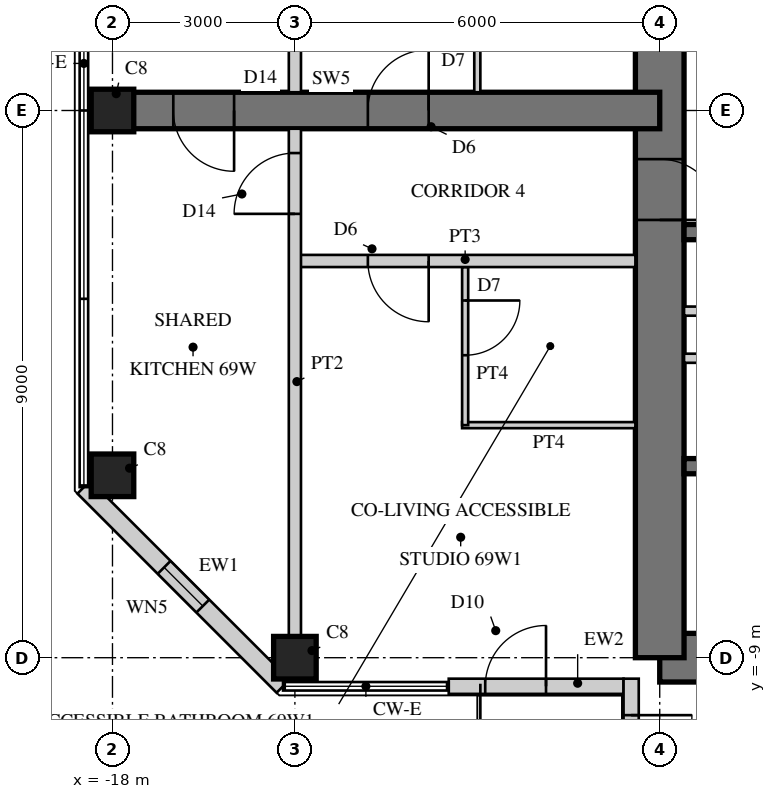
"""IFC4 building model, lengths in metres.
Left out: names, types, materials, properties, quantities, classifications, styles, units other than length and angle.
Written with IfcOpenShell. Run it as: python <this file> out.ifc"""

import sys

from ifc_helpers import new_model, si_unit, direction, frame, frame_2d, origin, origin_2d, place, context, subcontext, project, spatial, rectangle, hollow_rectangle, extrude, element, fill, save


model = new_model("IFC4")
c1 = context("Model", 3, precision=1e-05, world=origin(), true_north=direction((0.0, 1.0)))
c2 = subcontext(c1, "Body", "Model", "MODEL_VIEW")
j1 = project(units=[si_unit("LENGTHUNIT", "METRE"), si_unit("PLANEANGLEUNIT", "RADIAN")], contexts=[c1])
p1 = place(None, origin())
s1 = spatial("IfcSite", under=j1, at=p1, CompositionType="ELEMENT")
p2 = place(p1, origin())
s2 = spatial("IfcBuilding", under=s1, at=p2, CompositionType="ELEMENT")
p3 = place(p2, frame((0.0, 0.0, 267.9)))
s3 = spatial("IfcBuildingStorey", under=s2, at=p3, CompositionType="ELEMENT", Elevation=267.9)
p4 = place(p3, frame((-9.0, -9.0, 0.0), z_axis=(0.0, 0.0, 1.0), x_axis=(1.0, 0.0, 0.0)))
e1 = element("IfcWall", 1, at=p4, inside=s3, PredefinedType="SHEAR", context=c2, shape_type="SweptSolid", body=[
    extrude(rectangle(XDim=18.0, YDim=0.8, at=frame_2d((9.0, 0.0))), origin(), (0.0, 0.0, 1.0), 3.4),
])
p5 = place(p4, frame((9.8, 0.0, 0.0)))
e2 = element("IfcOpeningElement", 2, at=p5, cuts=e1, PredefinedType="OPENING", context=c2, shape_type="SweptSolid", body=[
    extrude(rectangle(XDim=1.0, YDim=2.4, at=frame_2d((0.5, 1.2))), frame((0.0, 0.41, 0.0), z_axis=(0.0, -1.0, 0.0), x_axis=(1.0, 0.0, 0.0)), (0.0, 0.0, 1.0), 0.82),
])
p6 = place(p3, frame((-9.0, 9.0, 0.0), z_axis=(0.0, 0.0, 1.0), x_axis=(0.0, -1.0, 0.0)))
e3 = element("IfcWall", 3, at=p6, inside=s3, PredefinedType="SHEAR", context=c2, shape_type="SweptSolid", body=[
    extrude(rectangle(XDim=18.0, YDim=0.8, at=frame_2d((9.0, 0.0))), origin(), (0.0, 0.0, 1.0), 3.4),
])
p7 = place(p6, frame((9.8, 0.0, 0.0)))
e4 = element("IfcOpeningElement", 4, at=p7, cuts=e3, PredefinedType="OPENING", context=c2, shape_type="SweptSolid", body=[
    extrude(rectangle(XDim=1.0, YDim=2.4, at=frame_2d((0.5, 1.2))), frame((0.0, 0.41, 0.0), z_axis=(0.0, -1.0, 0.0), x_axis=(1.0, 0.0, 0.0)), (0.0, 0.0, 1.0), 0.82),
])
p8 = place(p3, frame((-1.925, -2.0, 0.0), z_axis=(0.0, 0.0, 1.0), x_axis=(-1.0, 0.0, 0.0)))
e5 = element("IfcWall", 5, at=p8, inside=s3, PredefinedType="SHEAR", context=c2, shape_type="SweptSolid", body=[
    extrude(rectangle(XDim=6.675, YDim=0.25, at=frame_2d((3.337, 0.0))), origin(), (0.0, 0.0, 1.0), 3.4),
])
p9 = place(p3, frame((-1.925, -5.85, 0.0), z_axis=(0.0, 0.0, 1.0), x_axis=(-1.0, 0.0, 0.0)))
e6 = element("IfcWall", 6, at=p9, inside=s3, PredefinedType="SHEAR", context=c2, shape_type="SweptSolid", body=[
    extrude(rectangle(XDim=6.675, YDim=0.25, at=frame_2d((3.337, 0.0))), origin(), (0.0, 0.0, 1.0), 3.4),
])
p10 = place(p9, frame((0.496, 0.0, 0.0)))
e7 = element("IfcOpeningElement", 7, at=p10, cuts=e6, PredefinedType="OPENING", context=c2, shape_type="SweptSolid", body=[
    extrude(rectangle(XDim=1.1, YDim=2.2, at=frame_2d((0.55, 1.1))), frame((0.0, 0.135, 0.0), z_axis=(0.0, -1.0, 0.0), x_axis=(1.0, 0.0, 0.0)), (0.0, 0.0, 1.0), 0.27),
])
p11 = place(p9, frame((2.788, 0.0, 0.0)))
e8 = element("IfcOpeningElement", 8, at=p11, cuts=e6, PredefinedType="OPENING", context=c2, shape_type="SweptSolid", body=[
    extrude(rectangle(XDim=1.1, YDim=2.2, at=frame_2d((0.55, 1.1))), frame((0.0, 0.135, 0.0), z_axis=(0.0, -1.0, 0.0), x_axis=(1.0, 0.0, 0.0)), (0.0, 0.0, 1.0), 0.27),
])
p12 = place(p9, frame((5.079, 0.0, 0.0)))
e9 = element("IfcOpeningElement", 9, at=p12, cuts=e6, PredefinedType="OPENING", context=c2, shape_type="SweptSolid", body=[
    extrude(rectangle(XDim=1.1, YDim=2.2, at=frame_2d((0.55, 1.1))), frame((0.0, 0.135, 0.0), z_axis=(0.0, -1.0, 0.0), x_axis=(1.0, 0.0, 0.0)), (0.0, 0.0, 1.0), 0.27),
])
p13 = place(p3, frame((-1.925, -3.3, 0.0), z_axis=(0.0, 0.0, 1.0), x_axis=(-1.0, 0.0, 0.0)))
e10 = element("IfcWall", 10, at=p13, inside=s3, PredefinedType="PARTITIONING", context=c2, shape_type="SweptSolid", body=[
    extrude(rectangle(XDim=6.675, YDim=0.15, at=frame_2d((3.337, 0.0))), origin(), (0.0, 0.0, 1.0), 3.4),
])
p14 = place(p13, frame((0.075, 0.0, 0.0)))
e11 = element("IfcOpeningElement", 11, at=p14, cuts=e10, PredefinedType="OPENING", context=c2, shape_type="SweptSolid", body=[
    extrude(rectangle(XDim=0.8, YDim=2.1, at=frame_2d((0.4, 1.05))), frame((0.0, 0.085, 0.0), z_axis=(0.0, -1.0, 0.0), x_axis=(1.0, 0.0, 0.0)), (0.0, 0.0, 1.0), 0.17),
])
p15 = place(p13, frame((3.675, 0.0, 0.0)))
e12 = element("IfcOpeningElement", 12, at=p15, cuts=e10, PredefinedType="OPENING", context=c2, shape_type="SweptSolid", body=[
    extrude(rectangle(XDim=0.8, YDim=2.1, at=frame_2d((0.4, 1.05))), frame((0.0, 0.085, 0.0), z_axis=(0.0, -1.0, 0.0), x_axis=(1.0, 0.0, 0.0)), (0.0, 0.0, 1.0), 0.17),
])
p16 = place(p3, frame((-9.0, 0.0, 0.0), z_axis=(0.0, 0.0, 1.0), x_axis=(-1.0, 0.0, 0.0)))
e13 = element("IfcWall", 13, at=p16, inside=s3, PredefinedType="SHEAR", context=c2, shape_type="SweptSolid", body=[
    extrude(rectangle(XDim=9.0, YDim=0.6, at=frame_2d((4.5, 0.0))), origin(), (0.0, 0.0, 1.0), 3.4),
])
p17 = place(p16, frame((3.8, 0.0, 0.0)))
e14 = element("IfcOpeningElement", 14, at=p17, cuts=e13, PredefinedType="OPENING", context=c2, shape_type="SweptSolid", body=[
    extrude(rectangle(XDim=1.0, YDim=2.15, at=frame_2d((0.5, 1.075))), frame((0.0, 0.31, 0.0), z_axis=(0.0, -1.0, 0.0), x_axis=(1.0, 0.0, 0.0)), (0.0, 0.0, 1.0), 0.62),
])
p18 = place(p16, frame((7.0, 0.0, 0.0)))
e15 = element("IfcOpeningElement", 15, at=p18, cuts=e13, PredefinedType="OPENING", context=c2, shape_type="SweptSolid", body=[
    extrude(rectangle(XDim=1.0, YDim=2.2, at=frame_2d((0.5, 1.1))), frame((0.0, 0.31, 0.0), z_axis=(0.0, -1.0, 0.0), x_axis=(1.0, 0.0, 0.0)), (0.0, 0.0, 1.0), 0.62),
])
for number, where, z_axis, x_axis in (
    (16, (-15.0, -9.0, 0.0), (0.0, 0.0, 1.0), (1.0, 0.0, 0.0)),
    (17, (-18.0, 0.0, 0.0), (0.0, 0.0, 1.0), (1.0, 0.0, 0.0)),
    (18, (-18.0, -6.0, 0.0), (0.0, 0.0, 1.0), (1.0, 0.0, 0.0)),
):
    element("IfcColumn", number, at=place(p3, frame(where, z_axis=z_axis, x_axis=x_axis)), inside=s3, PredefinedType="COLUMN", context=c2, shape_type="SweptSolid", body=[
        extrude(rectangle(XDim=0.7, YDim=0.7, at=origin_2d()), origin(), (0.0, 0.0, 1.0), 3.4),
    ])
p19 = place(p3, frame((-18.47, -6.195, 0.0), z_axis=(0.0, 0.0, 1.0), x_axis=(0.707106781187, -0.707106781187, 0.0)))
e19 = element("IfcWall", 19, at=p19, inside=s3, PredefinedType="SOLIDWALL", context=c2, shape_type="SweptSolid", body=[
    extrude(rectangle(XDim=4.632, YDim=0.3, at=frame_2d((2.316, 0.0))), origin(), (0.0, 0.0, 1.0), 3.22),
])
p20 = place(p19, frame((1.866, 0.0, 0.3)))
e20 = element("IfcOpeningElement", 20, at=p20, cuts=e19, PredefinedType="OPENING", context=c2, shape_type="SweptSolid", body=[
    extrude(rectangle(XDim=0.9, YDim=2.4, at=frame_2d((0.45, 1.2))), frame((0.0, 0.16, 0.0), z_axis=(0.0, -1.0, 0.0), x_axis=(1.0, 0.0, 0.0)), (0.0, 0.0, 1.0), 0.32),
])
p21 = place(p3, frame((-12.47, -9.47, 0.0), z_axis=(0.0, 0.0, 1.0), x_axis=(1.0, 0.0, 0.0)))
e21 = element("IfcWall", 21, at=p21, inside=s3, PredefinedType="SOLIDWALL", context=c2, shape_type="SweptSolid", body=[
    extrude(rectangle(XDim=2.875, YDim=0.25, at=frame_2d((1.438, 0.0))), origin(), (0.0, 0.0, 1.0), 3.22),
])
p22 = place(p21, frame((0.6, 0.0, 0.0)))
e22 = element("IfcOpeningElement", 22, at=p22, cuts=e21, PredefinedType="OPENING", context=c2, shape_type="SweptSolid", body=[
    extrude(rectangle(XDim=1.0, YDim=2.2, at=frame_2d((0.5, 1.1))), frame((0.0, 0.135, 0.0), z_axis=(0.0, -1.0, 0.0), x_axis=(1.0, 0.0, 0.0)), (0.0, 0.0, 1.0), 0.27),
])
p23 = place(p3, frame((-9.47, -9.345, 0.0), z_axis=(0.0, 0.0, 1.0), x_axis=(0.0, -1.0, 0.0)))
e23 = element("IfcWall", 23, at=p23, inside=s3, PredefinedType="SOLIDWALL", context=c2, shape_type="SweptSolid", body=[
    extrude(rectangle(XDim=3.125, YDim=0.25, at=frame_2d((1.562, 0.0))), origin(), (0.0, 0.0, 1.0), 3.22),
])
p24 = place(p23, frame((0.6, 0.0, 0.0)))
e24 = element("IfcOpeningElement", 24, at=p24, cuts=e23, PredefinedType="OPENING", context=c2, shape_type="SweptSolid", body=[
    extrude(rectangle(XDim=1.0, YDim=2.2, at=frame_2d((0.5, 1.1))), frame((0.0, 0.135, 0.0), z_axis=(0.0, -1.0, 0.0), x_axis=(1.0, 0.0, 0.0)), (0.0, 0.0, 1.0), 0.27),
])
p25 = place(p3, frame((-3.325, -4.075, 0.0), z_axis=(0.0, 0.0, 1.0), x_axis=(-1.0, 0.0, 0.0)))
e25 = element("IfcWall", 25, at=p25, inside=s3, PredefinedType="PARTITIONING", context=c2, shape_type="SweptSolid", body=[
    extrude(rectangle(XDim=5.275, YDim=0.15, at=frame_2d((2.638, 0.0))), origin(), (0.0, 0.0, 1.0), 3.22),
])
p26 = place(p25, frame((2.137, 0.0, 0.0)))
e26 = element("IfcOpeningElement", 26, at=p26, cuts=e25, PredefinedType="OPENING", context=c2, shape_type="SweptSolid", body=[
    extrude(rectangle(XDim=1.0, YDim=2.1, at=frame_2d((0.5, 1.05))), frame((0.0, 0.085, 0.0), z_axis=(0.0, -1.0, 0.0), x_axis=(1.0, 0.0, 0.0)), (0.0, 0.0, 1.0), 0.17),
])
p27 = place(p3, frame((-9.4, -5.175, 0.0), z_axis=(0.0, 0.0, 1.0), x_axis=(-1.0, 0.0, 0.0)))
e27 = element("IfcWall", 27, at=p27, inside=s3, PredefinedType="PARTITIONING", context=c2, shape_type="SweptSolid", body=[
    extrude(rectangle(XDim=2.85, YDim=0.1, at=frame_2d((1.425, 0.0))), origin(), (0.0, 0.0, 1.0), 3.22),
])
p28 = place(p3, frame((-12.2, -2.575, 0.0), z_axis=(0.0, 0.0, 1.0), x_axis=(0.0, -1.0, 0.0)))
e28 = element("IfcWall", 28, at=p28, inside=s3, PredefinedType="PARTITIONING", context=c2, shape_type="SweptSolid", body=[
    extrude(rectangle(XDim=2.6, YDim=0.1, at=frame_2d((1.3, 0.0))), origin(), (0.0, 0.0, 1.0), 3.22),
])
p29 = place(p28, frame((0.55, 0.0, 0.0)))
e29 = element("IfcOpeningElement", 29, at=p29, cuts=e28, PredefinedType="OPENING", context=c2, shape_type="SweptSolid", body=[
    extrude(rectangle(XDim=0.9, YDim=2.1, at=frame_2d((0.45, 1.05))), frame((0.0, 0.06, 0.0), z_axis=(0.0, -1.0, 0.0), x_axis=(1.0, 0.0, 0.0)), (0.0, 0.0, 1.0), 0.12),
])
p30 = place(p3, frame((-12.0, 2.5, 0.0), z_axis=(0.0, 0.0, 1.0), x_axis=(0.0, -1.0, 0.0)))
e30 = element("IfcWall", 30, at=p30, inside=s3, PredefinedType="PARTITIONING", context=c2, shape_type="SweptSolid", body=[
    extrude(rectangle(XDim=2.2, YDim=0.1, at=frame_2d((1.1, 0.0))), origin(), (0.0, 0.0, 1.0), 3.22),
])
p31 = place(p30, frame((0.55, 0.0, 0.0)))
e31 = element("IfcOpeningElement", 31, at=p31, cuts=e30, PredefinedType="OPENING", context=c2, shape_type="SweptSolid", body=[
    extrude(rectangle(XDim=0.9, YDim=2.1, at=frame_2d((0.45, 1.05))), frame((0.0, 0.06, 0.0), z_axis=(0.0, -1.0, 0.0), x_axis=(1.0, 0.0, 0.0)), (0.0, 0.0, 1.0), 0.12),
])
p32 = place(p3, frame((-9.4, -2.475, 0.0), z_axis=(0.0, 0.0, 1.0), x_axis=(-1.0, 0.0, 0.0)))
e32 = element("IfcWall", 32, at=p32, inside=s3, PredefinedType="SOLIDWALL", context=c2, shape_type="SweptSolid", body=[
    extrude(rectangle(XDim=5.6, YDim=0.2, at=frame_2d((2.8, 0.0))), origin(), (0.0, 0.0, 1.0), 3.22),
])
p33 = place(p32, frame((3.4, 0.0, 0.0)))
e33 = element("IfcOpeningElement", 33, at=p33, cuts=e32, PredefinedType="OPENING", context=c2, shape_type="SweptSolid", body=[
    extrude(rectangle(XDim=1.0, YDim=2.15, at=frame_2d((0.5, 1.075))), frame((0.0, 0.11, 0.0), z_axis=(0.0, -1.0, 0.0), x_axis=(1.0, 0.0, 0.0)), (0.0, 0.0, 1.0), 0.22),
])
p34 = place(p3, frame((-15.0, 8.65, 0.0), z_axis=(0.0, 0.0, 1.0), x_axis=(0.0, -1.0, 0.0)))
e34 = element("IfcWall", 34, at=p34, inside=s3, PredefinedType="SOLIDWALL", context=c2, shape_type="SweptSolid", body=[
    extrude(rectangle(XDim=8.35, YDim=0.2, at=frame_2d((4.175, 0.0))), origin(), (0.0, 0.0, 1.0), 2.52),
])
p35 = place(p3, frame((-15.0, -0.3, 0.0), z_axis=(0.0, 0.0, 1.0), x_axis=(0.0, -1.0, 0.0)))
e35 = element("IfcWall", 35, at=p35, inside=s3, PredefinedType="SOLIDWALL", context=c2, shape_type="SweptSolid", body=[
    extrude(rectangle(XDim=8.35, YDim=0.2, at=frame_2d((4.175, 0.0))), origin(), (0.0, 0.0, 1.0), 2.52),
])
p36 = place(p35, frame((0.4, 0.0, 0.0)))
e36 = element("IfcOpeningElement", 36, at=p36, cuts=e35, PredefinedType="OPENING", context=c2, shape_type="SweptSolid", body=[
    extrude(rectangle(XDim=1.0, YDim=2.2, at=frame_2d((0.5, 1.1))), frame((0.0, 0.11, 0.0), z_axis=(0.0, -1.0, 0.0), x_axis=(1.0, 0.0, 0.0)), (0.0, 0.0, 1.0), 0.22),
])
p37 = place(p20, origin())
e37 = element("IfcWindow", 37, at=p37, inside=s3, PartitioningType="SINGLE_PANEL", PredefinedType="WINDOW", context=c2, shape_type="SweptSolid", body=[
    extrude(hollow_rectangle(XDim=0.9, YDim=2.4, WallThickness=0.06, at=frame_2d((0.45, 1.2))), frame((0.0, 0.03, 0.0), z_axis=(0.0, -1.0, 0.0), x_axis=(1.0, 0.0, 0.0)), (0.0, 0.0, 1.0), 0.06),
    extrude(rectangle(XDim=0.779, YDim=2.279, at=frame_2d((0.45, 1.2))), frame((0.0, 0.03, 0.0), z_axis=(0.0, -1.0, 0.0), x_axis=(1.0, 0.0, 0.0)), (0.0, 0.0, 1.0), 0.06),
])
fill(e20, e37)
p38 = place(p22, origin())
e38 = element("IfcDoor", 38, at=p38, inside=s3, OperationType="SINGLE_SWING_RIGHT", PredefinedType="DOOR", context=c2, shape_type="SweptSolid", body=[
    extrude(hollow_rectangle(XDim=1.0, YDim=2.2, WallThickness=0.06, at=frame_2d((0.5, 1.1))), frame((0.0, 0.025, 0.0), z_axis=(0.0, -1.0, 0.0), x_axis=(1.0, 0.0, 0.0)), (0.0, 0.0, 1.0), 0.05),
    extrude(rectangle(XDim=0.879, YDim=2.079, at=frame_2d((0.5, 1.1))), frame((0.0, 0.025, 0.0), z_axis=(0.0, -1.0, 0.0), x_axis=(1.0, 0.0, 0.0)), (0.0, 0.0, 1.0), 0.05),
])
fill(e22, e38)
p39 = place(p24, origin())
e39 = element("IfcDoor", 39, at=p39, inside=s3, OperationType="SINGLE_SWING_LEFT", PredefinedType="DOOR", context=c2, shape_type="SweptSolid", body=[
    extrude(hollow_rectangle(XDim=1.0, YDim=2.2, WallThickness=0.06, at=frame_2d((0.5, 1.1))), frame((0.0, 0.025, 0.0), z_axis=(0.0, -1.0, 0.0), x_axis=(1.0, 0.0, 0.0)), (0.0, 0.0, 1.0), 0.05),
    extrude(rectangle(XDim=0.879, YDim=2.079, at=frame_2d((0.5, 1.1))), frame((0.0, 0.025, 0.0), z_axis=(0.0, -1.0, 0.0), x_axis=(1.0, 0.0, 0.0)), (0.0, 0.0, 1.0), 0.05),
])
fill(e24, e39)
p40 = place(p29, origin())
e40 = element("IfcDoor", 40, at=p40, inside=s3, OperationType="SINGLE_SWING_LEFT", PredefinedType="DOOR", context=c2, shape_type="SweptSolid", body=[
    extrude(rectangle(XDim=0.9, YDim=2.1, at=frame_2d((0.45, 1.05))), frame((0.0, 0.025, 0.0), z_axis=(0.0, -1.0, 0.0), x_axis=(1.0, 0.0, 0.0)), (0.0, 0.0, 1.0), 0.05),
])
fill(e29, e40)
p41 = place(p33, origin())
e41 = element("IfcDoor", 41, at=p41, inside=s3, OperationType="SINGLE_SWING_LEFT", PredefinedType="DOOR", context=c2, shape_type="SweptSolid", body=[
    extrude(rectangle(XDim=1.0, YDim=2.15, at=frame_2d((0.5, 1.075))), frame((0.0, 0.025, 0.0), z_axis=(0.0, -1.0, 0.0), x_axis=(1.0, 0.0, 0.0)), (0.0, 0.0, 1.0), 0.05),
])
fill(e33, e41)
p42 = place(p36, frame((1.0, 0.0, 0.0), z_axis=(0.0, 0.0, 1.0), x_axis=(-1.0, 0.0, 0.0)))
e42 = element("IfcDoor", 42, at=p42, inside=s3, OperationType="SINGLE_SWING_LEFT", PredefinedType="DOOR", context=c2, shape_type="SweptSolid", body=[
    extrude(rectangle(XDim=1.0, YDim=2.2, at=frame_2d((0.5, 1.1))), frame((0.0, 0.025, 0.0), z_axis=(0.0, -1.0, 0.0), x_axis=(1.0, 0.0, 0.0)), (0.0, 0.0, 1.0), 0.05),
])
fill(e36, e42)
p43 = place(p17, frame((1.0, 0.0, 0.0), z_axis=(0.0, 0.0, 1.0), x_axis=(-1.0, 0.0, 0.0)))
e43 = element("IfcDoor", 43, at=p43, inside=s3, OperationType="SINGLE_SWING_RIGHT", PredefinedType="DOOR", context=c2, shape_type="SweptSolid", body=[
    extrude(rectangle(XDim=1.0, YDim=2.15, at=frame_2d((0.5, 1.075))), frame((0.0, 0.025, 0.0), z_axis=(0.0, -1.0, 0.0), x_axis=(1.0, 0.0, 0.0)), (0.0, 0.0, 1.0), 0.05),
])
fill(e14, e43)
p44 = place(p18, origin())
e44 = element("IfcDoor", 44, at=p44, inside=s3, OperationType="SINGLE_SWING_LEFT", PredefinedType="DOOR", context=c2, shape_type="SweptSolid", body=[
    extrude(rectangle(XDim=1.0, YDim=2.2, at=frame_2d((0.5, 1.1))), frame((0.0, 0.025, 0.0), z_axis=(0.0, -1.0, 0.0), x_axis=(1.0, 0.0, 0.0)), (0.0, 0.0, 1.0), 0.05),
])
fill(e15, e44)
p45 = place(p7, origin())
e45 = element("IfcDoor", 45, at=p45, inside=s3, OperationType="SINGLE_SWING_RIGHT", PredefinedType="DOOR", context=c2, shape_type="SweptSolid", body=[
    extrude(rectangle(XDim=1.0, YDim=2.4, at=frame_2d((0.5, 1.2))), frame((0.0, 0.055, 0.0), z_axis=(0.0, -1.0, 0.0), x_axis=(1.0, 0.0, 0.0)), (0.0, 0.0, 1.0), 0.05),
])
fill(e4, e45)
save(model, sys.argv[1])
